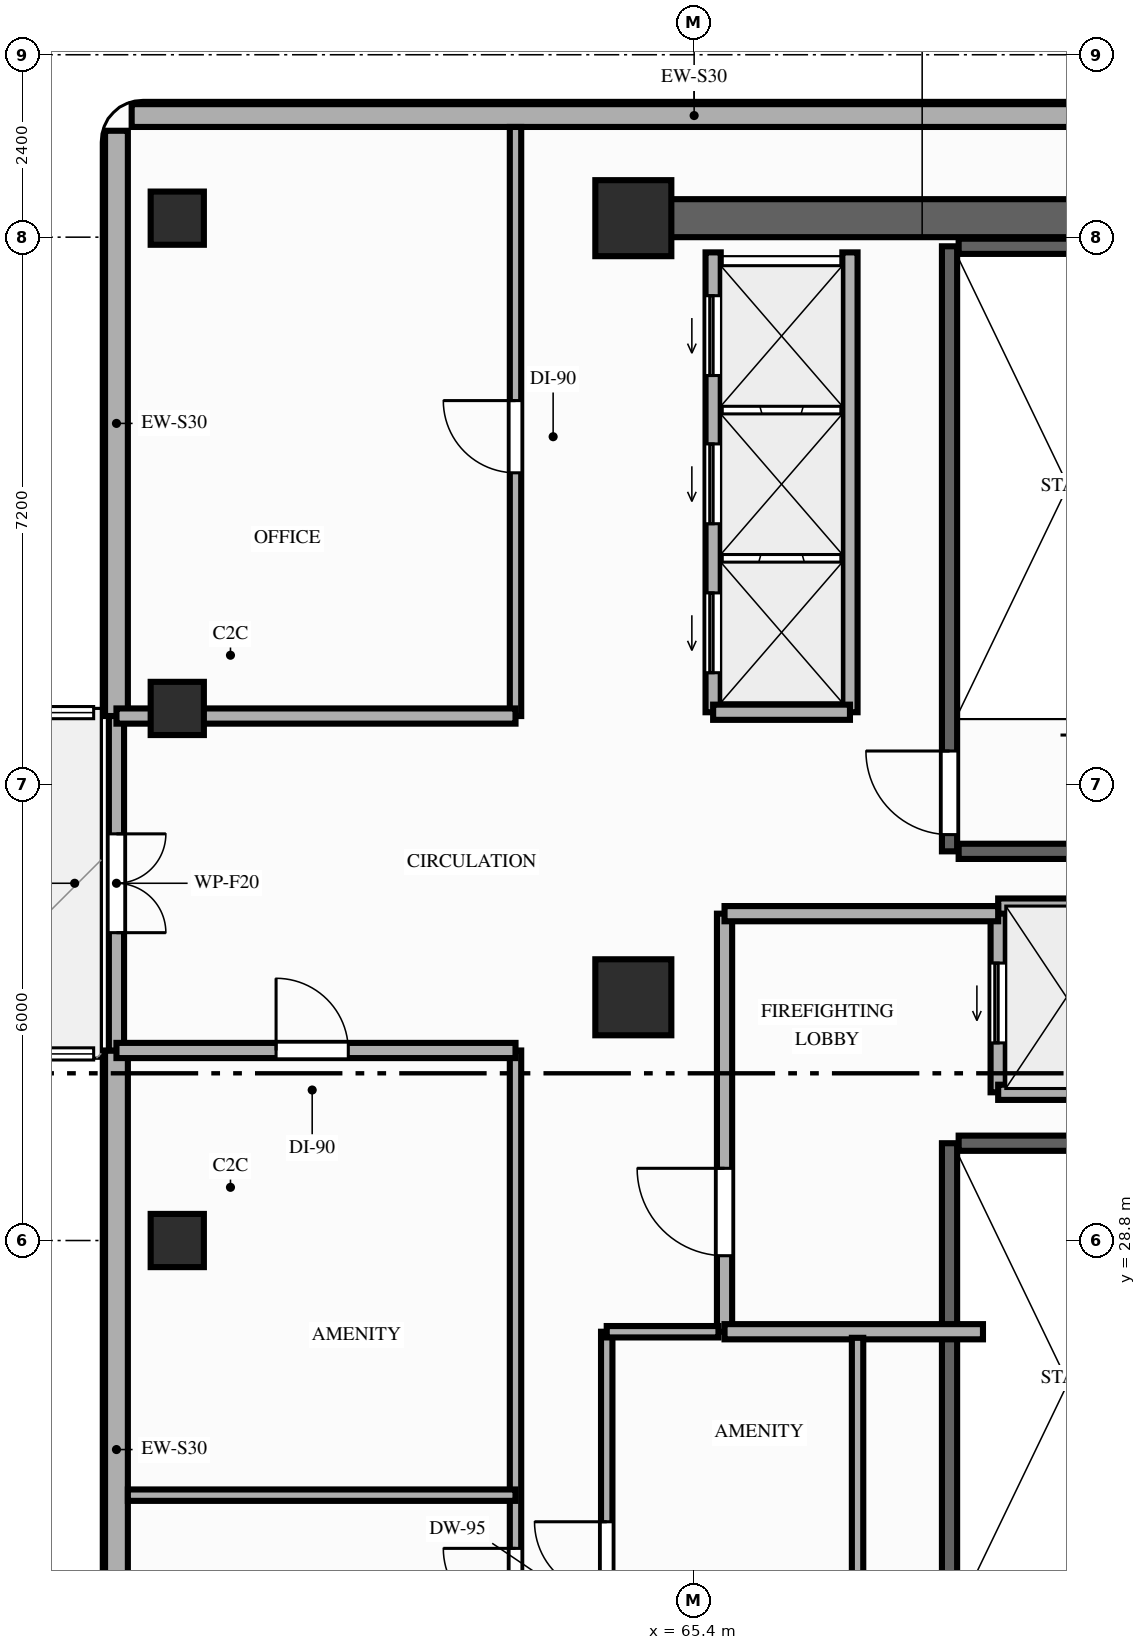
"""IFC4 building model, lengths in metres.
Left out: names, types, materials, properties, quantities, classifications, styles, units other than length and angle.
Written with IfcOpenShell. Run it as: python <this file> out.ifc"""

import sys

from ifc_helpers import new_model, si_unit, direction, frame, frame_2d, origin, origin_2d, place, context, subcontext, project, spatial, rectangle, extrude, element, fill, save


model = new_model("IFC4")
c1 = context("Model", 3, precision=1e-05, world=origin(), true_north=direction((0.0, 1.0)))
c2 = subcontext(c1, "Body", "Model", "MODEL_VIEW")
j1 = project(units=[si_unit("LENGTHUNIT", "METRE"), si_unit("PLANEANGLEUNIT", "RADIAN")], contexts=[c1])
p1 = place(None, origin())
s1 = spatial("IfcSite", under=j1, at=p1, CompositionType="ELEMENT")
p2 = place(p1, origin())
s2 = spatial("IfcBuilding", under=s1, at=p2, CompositionType="ELEMENT")
p3 = place(p2, frame((0.0, 0.0, 102.6)))
s3 = spatial("IfcBuildingStorey", under=s2, at=p3, CompositionType="ELEMENT", Elevation=102.6)
for number, where, z_axis, x_axis in (
    (1, (64.6, 32.0, 0.0), (0.0, 0.0, 1.0), (1.0, 0.0, 0.0)),
    (2, (64.6, 42.25, 0.0), (0.0, 0.0, 1.0), (1.0, 0.0, 0.0)),
):
    element("IfcColumn", number, at=place(p3, frame(where, z_axis=z_axis, x_axis=x_axis)), inside=s3, PredefinedType="COLUMN", context=c2, shape_type="SweptSolid", body=[
        extrude(rectangle(XDim=1.0, YDim=1.0, at=origin_2d()), origin(), (0.0, 0.0, 1.0), 4.8),
    ])
for number, where, z_axis, x_axis in (
    (3, (58.6, 28.8, 0.0), (0.0, 0.0, 1.0), (1.0, 0.0, 0.0)),
    (4, (58.6, 35.8, 0.0), (0.0, 0.0, 1.0), (1.0, 0.0, 0.0)),
    (5, (58.6, 42.25, 0.0), (0.0, 0.0, 1.0), (1.0, 0.0, 0.0)),
):
    element("IfcColumn", number, at=place(p3, frame(where, z_axis=z_axis, x_axis=x_axis)), inside=s3, PredefinedType="COLUMN", context=c2, shape_type="SweptSolid", body=[
        extrude(rectangle(XDim=0.7, YDim=0.7, at=origin_2d()), origin(), (0.0, 0.0, 1.0), 4.8),
    ])
p4 = place(p3, frame((57.8, 31.3, 0.0), z_axis=(0.0, 0.0, 1.0), x_axis=(0.0, -1.0, 0.0)))
e6 = element("IfcWall", 6, at=p4, inside=s3, PredefinedType="STANDARD", context=c2, shape_type="SweptSolid", body=[
    extrude(rectangle(XDim=10.5, YDim=0.3, at=frame_2d((5.25, 0.0))), origin(), (0.0, 0.0, 1.0), 4.58),
])
p5 = place(p3, frame((57.8, 43.4, 0.0), z_axis=(0.0, 0.0, 1.0), x_axis=(0.0, -1.0, 0.0)))
e7 = element("IfcWall", 7, at=p5, inside=s3, PredefinedType="STANDARD", context=c2, shape_type="SweptSolid", body=[
    extrude(rectangle(XDim=7.7, YDim=0.3, at=frame_2d((3.85, 0.0))), origin(), (0.0, 0.0, 1.0), 4.58),
])
p6 = place(p3, frame((72.8, 43.6, 0.0), z_axis=(0.0, 0.0, 1.0), x_axis=(-1.0, 0.0, 0.0)))
e8 = element("IfcWall", 8, at=p6, inside=s3, PredefinedType="STANDARD", context=c2, shape_type="SweptSolid", body=[
    extrude(rectangle(XDim=14.8, YDim=0.3, at=frame_2d((7.4, 0.0))), origin(), (0.0, 0.0, 1.0), 4.58),
])
p7 = place(p3, frame((64.6, 42.25, 0.0), z_axis=(0.0, 0.0, 1.0), x_axis=(1.0, 0.0, 0.0)))
e9 = element("IfcWall", 9, at=p7, inside=s3, PredefinedType="SHEAR", context=c2, shape_type="SweptSolid", body=[
    extrude(rectangle(XDim=7.5, YDim=0.5, at=frame_2d((3.75, 0.0))), origin(), (0.0, 0.0, 1.0), 4.56),
])
p8 = place(p3, frame((68.76, 22.26, 0.0), z_axis=(0.0, 0.0, 1.0), x_axis=(0.0, 1.0, 0.0)))
e10 = element("IfcWall", 10, at=p8, inside=s3, PredefinedType="SHEAR", context=c2, shape_type="SweptSolid", body=[
    extrude(rectangle(XDim=7.82, YDim=0.2, at=frame_2d((3.91, 0.0))), origin(), (0.0, 0.0, 1.0), 4.56),
])
p9 = place(p8, frame((0.22, 0.0, 0.0)))
e11 = element("IfcOpeningElement", 11, at=p9, cuts=e10, PredefinedType="OPENING", context=c2, shape_type="SweptSolid", body=[
    extrude(rectangle(XDim=1.1, YDim=2.15, at=frame_2d((0.55, 1.075))), frame((0.0, 0.11, 0.0), z_axis=(0.0, -1.0, 0.0), x_axis=(1.0, 0.0, 0.0)), (0.0, 0.0, 1.0), 0.22),
])
p10 = place(p3, frame((68.88, 30.08, 0.0), z_axis=(0.0, 0.0, 1.0), x_axis=(1.0, 0.0, 0.0)))
e12 = element("IfcWall", 12, at=p10, inside=s3, PredefinedType="SHEAR", context=c2, shape_type="SweptSolid", body=[
    extrude(rectangle(XDim=2.88, YDim=0.2, at=frame_2d((1.44, 0.0))), origin(), (0.0, 0.0, 1.0), 4.56),
])
p11 = place(p3, frame((68.76, 33.92, 0.0), z_axis=(0.0, 0.0, 1.0), x_axis=(0.0, 1.0, 0.0)))
e13 = element("IfcWall", 13, at=p11, inside=s3, PredefinedType="SHEAR", context=c2, shape_type="SweptSolid", body=[
    extrude(rectangle(XDim=7.96, YDim=0.2, at=frame_2d((3.98, 0.0))), origin(), (0.0, 0.0, 1.0), 4.56),
])
p12 = place(p11, frame((0.22, 0.0, 0.0)))
e14 = element("IfcOpeningElement", 14, at=p12, cuts=e13, PredefinedType="OPENING", context=c2, shape_type="SweptSolid", body=[
    extrude(rectangle(XDim=1.1, YDim=2.15, at=frame_2d((0.55, 1.075))), frame((0.0, 0.11, 0.0), z_axis=(0.0, -1.0, 0.0), x_axis=(1.0, 0.0, 0.0)), (0.0, 0.0, 1.0), 0.22),
])
for number, where, z_axis, x_axis in (
    (15, (68.88, 41.88, 0.0), (0.0, 0.0, 1.0), (1.0, 0.0, 0.0)),
    (16, (68.88, 33.92, 0.0), (0.0, 0.0, 1.0), (1.0, 0.0, 0.0)),
):
    element("IfcWall", number, at=place(p3, frame(where, z_axis=z_axis, x_axis=x_axis)), inside=s3, PredefinedType="SHEAR", context=c2, shape_type="SweptSolid", body=[
        extrude(rectangle(XDim=2.88, YDim=0.2, at=frame_2d((1.44, 0.0))), origin(), (0.0, 0.0, 1.0), 4.56),
    ])
p13 = place(p3, frame((65.65, 35.75, 0.0), z_axis=(0.0, 0.0, 1.0), x_axis=(0.0, 1.0, 0.0)))
e17 = element("IfcWall", 17, at=p13, inside=s3, PredefinedType="MOVABLE", context=c2, shape_type="SweptSolid", body=[
    extrude(rectangle(XDim=6.05, YDim=0.2, at=frame_2d((3.025, 0.0))), origin(), (0.0, 0.0, 1.0), 4.56),
])
p14 = place(p13, frame((0.52, 0.0, 0.0)))
e18 = element("IfcOpeningElement", 18, at=p14, cuts=e17, PredefinedType="OPENING", context=c2, shape_type="SweptSolid", body=[
    extrude(rectangle(XDim=1.05, YDim=2.15, at=frame_2d((0.525, 1.075))), frame((0.0, 0.11, 0.0), z_axis=(0.0, -1.0, 0.0), x_axis=(1.0, 0.0, 0.0)), (0.0, 0.0, 1.0), 0.22),
])
p15 = place(p13, frame((2.48, 0.0, 0.0)))
e19 = element("IfcOpeningElement", 19, at=p15, cuts=e17, PredefinedType="OPENING", context=c2, shape_type="SweptSolid", body=[
    extrude(rectangle(XDim=1.05, YDim=2.15, at=frame_2d((0.525, 1.075))), frame((0.0, 0.11, 0.0), z_axis=(0.0, -1.0, 0.0), x_axis=(1.0, 0.0, 0.0)), (0.0, 0.0, 1.0), 0.22),
])
p16 = place(p13, frame((4.43, 0.0, 0.0)))
e20 = element("IfcOpeningElement", 20, at=p16, cuts=e17, PredefinedType="OPENING", context=c2, shape_type="SweptSolid", body=[
    extrude(rectangle(XDim=1.05, YDim=2.15, at=frame_2d((0.525, 1.075))), frame((0.0, 0.11, 0.0), z_axis=(0.0, -1.0, 0.0), x_axis=(1.0, 0.0, 0.0)), (0.0, 0.0, 1.0), 0.22),
])
p17 = place(p3, frame((67.45, 35.75, 0.0), z_axis=(0.0, 0.0, 1.0), x_axis=(0.0, 1.0, 0.0)))
e21 = element("IfcWall", 21, at=p17, inside=s3, PredefinedType="MOVABLE", context=c2, shape_type="SweptSolid", body=[
    extrude(rectangle(XDim=6.05, YDim=0.2, at=frame_2d((3.025, 0.0))), origin(), (0.0, 0.0, 1.0), 4.56),
])
p18 = place(p3, frame((65.65, 35.75, 0.0), z_axis=(0.0, 0.0, 1.0), x_axis=(1.0, 0.0, 0.0)))
e22 = element("IfcWall", 22, at=p18, inside=s3, PredefinedType="MOVABLE", context=c2, shape_type="SweptSolid", body=[
    extrude(rectangle(XDim=1.8, YDim=0.2, at=frame_2d((0.9, 0.0))), origin(), (0.0, 0.0, 1.0), 4.56),
])
p19 = place(p3, frame((69.4, 30.75, 0.0), z_axis=(0.0, 0.0, 1.0), x_axis=(0.0, 1.0, 0.0)))
e23 = element("IfcWall", 23, at=p19, inside=s3, PredefinedType="MOVABLE", context=c2, shape_type="SweptSolid", body=[
    extrude(rectangle(XDim=2.45, YDim=0.2, at=frame_2d((1.225, 0.0))), origin(), (0.0, 0.0, 1.0), 4.56),
])
p20 = place(p19, frame((0.65, 0.0, 0.0)))
e24 = element("IfcOpeningElement", 24, at=p20, cuts=e23, PredefinedType="OPENING", context=c2, shape_type="SweptSolid", body=[
    extrude(rectangle(XDim=1.05, YDim=2.15, at=frame_2d((0.525, 1.075))), frame((0.0, 0.11, 0.0), z_axis=(0.0, -1.0, 0.0), x_axis=(1.0, 0.0, 0.0)), (0.0, 0.0, 1.0), 0.22),
])
for number, where, z_axis, x_axis in (
    (25, (69.4, 33.2, 0.0), (0.0, 0.0, 1.0), (1.0, 0.0, 0.0)),
    (26, (69.4, 30.75, 0.0), (0.0, 0.0, 1.0), (1.0, 0.0, 0.0)),
):
    element("IfcWall", number, at=place(p3, frame(where, z_axis=z_axis, x_axis=x_axis)), inside=s3, PredefinedType="MOVABLE", context=c2, shape_type="SweptSolid", body=[
        extrude(rectangle(XDim=1.75, YDim=0.2, at=frame_2d((0.875, 0.0))), origin(), (0.0, 0.0, 1.0), 4.56),
    ])
p21 = place(p3, frame((65.8, 27.6, 0.0), z_axis=(0.0, 0.0, 1.0), x_axis=(0.0, 1.0, 0.0)))
e27 = element("IfcWall", 27, at=p21, inside=s3, PredefinedType="PARTITIONING", context=c2, shape_type="SweptSolid", body=[
    extrude(rectangle(XDim=5.5, YDim=0.2, at=frame_2d((2.75, 0.0))), origin(), (0.0, 0.0, 1.0), 4.56),
])
p22 = place(p21, frame((1.0, 0.0, 0.0)))
e28 = element("IfcOpeningElement", 28, at=p22, cuts=e27, PredefinedType="OPENING", context=c2, shape_type="SweptSolid", body=[
    extrude(rectangle(XDim=1.15, YDim=2.15, at=frame_2d((0.575, 1.075))), frame((0.0, 0.11, 0.0), z_axis=(0.0, -1.0, 0.0), x_axis=(1.0, 0.0, 0.0)), (0.0, 0.0, 1.0), 0.22),
])
p23 = place(p3, frame((65.8, 33.1, 0.0), z_axis=(0.0, 0.0, 1.0), x_axis=(1.0, 0.0, 0.0)))
e29 = element("IfcWall", 29, at=p23, inside=s3, PredefinedType="PARTITIONING", context=c2, shape_type="SweptSolid", body=[
    extrude(rectangle(XDim=3.6, YDim=0.2, at=frame_2d((1.8, 0.0))), origin(), (0.0, 0.0, 1.0), 4.56),
])
p24 = place(p3, frame((65.8, 27.6, 0.0), z_axis=(0.0, 0.0, 1.0), x_axis=(1.0, 0.0, 0.0)))
e30 = element("IfcWall", 30, at=p24, inside=s3, PredefinedType="PARTITIONING", context=c2, shape_type="SweptSolid", body=[
    extrude(rectangle(XDim=3.4, YDim=0.2, at=frame_2d((1.7, 0.0))), origin(), (0.0, 0.0, 1.0), 4.56),
])
p25 = place(p3, frame((57.8, 31.3, 0.0), z_axis=(0.0, 0.0, 1.0), x_axis=(0.0, 1.0, 0.0)))
e31 = element("IfcWall", 31, at=p25, inside=s3, PredefinedType="PARTITIONING", context=c2, shape_type="SweptSolid", body=[
    extrude(rectangle(XDim=4.4, YDim=0.2, at=frame_2d((2.2, 0.0))), origin(), (0.0, 0.0, 1.0), 4.56),
])
p26 = place(p25, frame((1.55, 0.0, 0.0)))
e32 = element("IfcOpeningElement", 32, at=p26, cuts=e31, PredefinedType="OPENING", context=c2, shape_type="SweptSolid", body=[
    extrude(rectangle(XDim=1.3, YDim=2.3, at=frame_2d((0.65, 1.15))), frame((0.0, 0.11, 0.0), z_axis=(0.0, -1.0, 0.0), x_axis=(1.0, 0.0, 0.0)), (0.0, 0.0, 1.0), 0.22),
])
p27 = place(p3, frame((64.25, 21.05, 0.0), z_axis=(0.0, 0.0, 1.0), x_axis=(0.0, 1.0, 0.0)))
e33 = element("IfcWall", 33, at=p27, inside=s3, PredefinedType="PARTITIONING", context=c2, shape_type="SweptSolid", body=[
    extrude(rectangle(XDim=6.55, YDim=0.15, at=frame_2d((3.275, 0.0))), origin(), (0.0, 0.0, 1.0), 4.17),
])
p28 = place(p27, frame((3.1, 0.0, 0.0)))
e34 = element("IfcOpeningElement", 34, at=p28, cuts=e33, PredefinedType="OPENING", context=c2, shape_type="SweptSolid", body=[
    extrude(rectangle(XDim=0.95, YDim=2.15, at=frame_2d((0.475, 1.075))), frame((0.0, 0.085, 0.0), z_axis=(0.0, -1.0, 0.0), x_axis=(1.0, 0.0, 0.0)), (0.0, 0.0, 1.0), 0.17),
])
p29 = place(p3, frame((67.55, 21.05, 0.0), z_axis=(0.0, 0.0, 1.0), x_axis=(0.0, 1.0, 0.0)))
e35 = element("IfcWall", 35, at=p29, inside=s3, PredefinedType="PARTITIONING", context=c2, shape_type="SweptSolid", body=[
    extrude(rectangle(XDim=6.47, YDim=0.15, at=frame_2d((3.235, 0.0))), origin(), (0.0, 0.0, 1.0), 4.17),
])
p30 = place(p3, frame((64.25, 27.6, 0.0), z_axis=(0.0, 0.0, 1.0), x_axis=(1.0, 0.0, 0.0)))
e36 = element("IfcWall", 36, at=p30, inside=s3, PredefinedType="PARTITIONING", context=c2, shape_type="SweptSolid", body=[
    extrude(rectangle(XDim=1.47, YDim=0.15, at=frame_2d((0.735, 0.0))), origin(), (0.0, 0.0, 1.0), 4.17),
])
p31 = place(p3, frame((63.05, 20.75, 0.0), z_axis=(0.0, 0.0, 1.0), x_axis=(0.0, 1.0, 0.0)))
e37 = element("IfcWall", 37, at=p31, inside=s3, PredefinedType="PARTITIONING", context=c2, shape_type="SweptSolid", body=[
    extrude(rectangle(XDim=10.55, YDim=0.15, at=frame_2d((5.275, 0.0))), origin(), (0.0, 0.0, 1.0), 4.17),
])
p32 = place(p31, frame((0.73, 0.0, 0.0)))
e38 = element("IfcOpeningElement", 38, at=p32, cuts=e37, PredefinedType="OPENING", context=c2, shape_type="SweptSolid", body=[
    extrude(rectangle(XDim=0.85, YDim=2.1, at=frame_2d((0.425, 1.05))), frame((0.0, 0.085, 0.0), z_axis=(0.0, -1.0, 0.0), x_axis=(1.0, 0.0, 0.0)), (0.0, 0.0, 1.0), 0.17),
])
p33 = place(p31, frame((3.05, 0.0, 0.0)))
e39 = element("IfcOpeningElement", 39, at=p33, cuts=e37, PredefinedType="OPENING", context=c2, shape_type="SweptSolid", body=[
    extrude(rectangle(XDim=0.95, YDim=2.1, at=frame_2d((0.475, 1.05))), frame((0.0, 0.085, 0.0), z_axis=(0.0, -1.0, 0.0), x_axis=(1.0, 0.0, 0.0)), (0.0, 0.0, 1.0), 0.17),
])
p34 = place(p3, frame((63.05, 35.7, 0.0), z_axis=(0.0, 0.0, 1.0), x_axis=(0.0, 1.0, 0.0)))
e40 = element("IfcWall", 40, at=p34, inside=s3, PredefinedType="PARTITIONING", context=c2, shape_type="SweptSolid", body=[
    extrude(rectangle(XDim=7.75, YDim=0.15, at=frame_2d((3.875, 0.0))), origin(), (0.0, 0.0, 1.0), 4.17),
])
p35 = place(p34, frame((3.2, 0.0, 0.0)))
e41 = element("IfcOpeningElement", 41, at=p35, cuts=e40, PredefinedType="OPENING", context=c2, shape_type="SweptSolid", body=[
    extrude(rectangle(XDim=0.95, YDim=2.15, at=frame_2d((0.475, 1.075))), frame((0.0, 0.085, 0.0), z_axis=(0.0, -1.0, 0.0), x_axis=(1.0, 0.0, 0.0)), (0.0, 0.0, 1.0), 0.17),
])
p36 = place(p3, frame((57.8, 31.3, 0.0), z_axis=(0.0, 0.0, 1.0), x_axis=(1.0, 0.0, 0.0)))
e42 = element("IfcWall", 42, at=p36, inside=s3, PredefinedType="PARTITIONING", context=c2, shape_type="SweptSolid", body=[
    extrude(rectangle(XDim=5.25, YDim=0.2, at=frame_2d((2.625, 0.0))), origin(), (0.0, 0.0, 1.0), 4.17),
])
p37 = place(p36, frame((2.1, 0.0, 0.0)))
e43 = element("IfcOpeningElement", 43, at=p37, cuts=e42, PredefinedType="OPENING", context=c2, shape_type="SweptSolid", body=[
    extrude(rectangle(XDim=0.95, YDim=2.15, at=frame_2d((0.475, 1.075))), frame((0.0, 0.11, 0.0), z_axis=(0.0, -1.0, 0.0), x_axis=(1.0, 0.0, 0.0)), (0.0, 0.0, 1.0), 0.22),
])
p38 = place(p3, frame((57.8, 35.7, 0.0), z_axis=(0.0, 0.0, 1.0), x_axis=(1.0, 0.0, 0.0)))
e44 = element("IfcWall", 44, at=p38, inside=s3, PredefinedType="PARTITIONING", context=c2, shape_type="SweptSolid", body=[
    extrude(rectangle(XDim=5.25, YDim=0.2, at=frame_2d((2.625, 0.0))), origin(), (0.0, 0.0, 1.0), 4.17),
])
p39 = place(p3, frame((57.95, 25.45, 0.0), z_axis=(0.0, 0.0, 1.0), x_axis=(1.0, 0.0, 0.0)))
e45 = element("IfcWall", 45, at=p39, inside=s3, PredefinedType="PARTITIONING", context=c2, shape_type="SweptSolid", body=[
    extrude(rectangle(XDim=5.1, YDim=0.15, at=frame_2d((2.55, 0.0))), origin(), (0.0, 0.0, 1.0), 4.17),
])
p40 = place(p12, origin())
e46 = element("IfcDoor", 46, at=p40, inside=s3, OperationType="SINGLE_SWING_RIGHT", PredefinedType="DOOR", context=c2, shape_type="SweptSolid", body=[
    extrude(rectangle(XDim=1.1, YDim=2.15, at=frame_2d((0.55, 1.075))), frame((0.0, 0.025, 0.0), z_axis=(0.0, -1.0, 0.0), x_axis=(1.0, 0.0, 0.0)), (0.0, 0.0, 1.0), 0.05),
])
fill(e14, e46)
p41 = place(p14, origin())
e47 = element("IfcDoor", 47, at=p41, inside=s3, OperationType="SLIDING_TO_LEFT", PredefinedType="DOOR", context=c2, shape_type="SweptSolid", body=[
    extrude(rectangle(XDim=1.05, YDim=2.15, at=frame_2d((0.525, 1.075))), frame((0.0, 0.025, 0.0), z_axis=(0.0, -1.0, 0.0), x_axis=(1.0, 0.0, 0.0)), (0.0, 0.0, 1.0), 0.05),
])
fill(e18, e47)
p42 = place(p15, origin())
e48 = element("IfcDoor", 48, at=p42, inside=s3, OperationType="SLIDING_TO_LEFT", PredefinedType="DOOR", context=c2, shape_type="SweptSolid", body=[
    extrude(rectangle(XDim=1.05, YDim=2.15, at=frame_2d((0.525, 1.075))), frame((0.0, 0.025, 0.0), z_axis=(0.0, -1.0, 0.0), x_axis=(1.0, 0.0, 0.0)), (0.0, 0.0, 1.0), 0.05),
])
fill(e19, e48)
p43 = place(p16, origin())
e49 = element("IfcDoor", 49, at=p43, inside=s3, OperationType="SLIDING_TO_LEFT", PredefinedType="DOOR", context=c2, shape_type="SweptSolid", body=[
    extrude(rectangle(XDim=1.05, YDim=2.15, at=frame_2d((0.525, 1.075))), frame((0.0, 0.025, 0.0), z_axis=(0.0, -1.0, 0.0), x_axis=(1.0, 0.0, 0.0)), (0.0, 0.0, 1.0), 0.05),
])
fill(e20, e49)
p44 = place(p20, origin())
e50 = element("IfcDoor", 50, at=p44, inside=s3, OperationType="SLIDING_TO_LEFT", PredefinedType="DOOR", context=c2, shape_type="SweptSolid", body=[
    extrude(rectangle(XDim=1.05, YDim=2.15, at=frame_2d((0.525, 1.075))), frame((0.0, 0.025, 0.0), z_axis=(0.0, -1.0, 0.0), x_axis=(1.0, 0.0, 0.0)), (0.0, 0.0, 1.0), 0.05),
])
fill(e24, e50)
p45 = place(p22, origin())
e51 = element("IfcDoor", 51, at=p45, inside=s3, OperationType="SINGLE_SWING_RIGHT", PredefinedType="DOOR", context=c2, shape_type="SweptSolid", body=[
    extrude(rectangle(XDim=1.15, YDim=2.15, at=frame_2d((0.575, 1.075))), frame((0.0, 0.025, 0.0), z_axis=(0.0, -1.0, 0.0), x_axis=(1.0, 0.0, 0.0)), (0.0, 0.0, 1.0), 0.05),
])
fill(e28, e51)
p46 = place(p26, origin())
e52 = element("IfcDoor", 52, at=p46, inside=s3, OperationType="DOUBLE_SWING_RIGHT", PredefinedType="DOOR", context=c2, shape_type="SweptSolid", body=[
    extrude(rectangle(XDim=1.3, YDim=2.3, at=frame_2d((0.65, 1.15))), frame((0.0, 0.025, 0.0), z_axis=(0.0, -1.0, 0.0), x_axis=(1.0, 0.0, 0.0)), (0.0, 0.0, 1.0), 0.05),
])
fill(e32, e52)
p47 = place(p28, origin())
e53 = element("IfcDoor", 53, at=p47, inside=s3, OperationType="SINGLE_SWING_RIGHT", PredefinedType="DOOR", context=c2, shape_type="SweptSolid", body=[
    extrude(rectangle(XDim=0.95, YDim=2.15, at=frame_2d((0.475, 1.075))), frame((0.0, 0.025, 0.0), z_axis=(0.0, -1.0, 0.0), x_axis=(1.0, 0.0, 0.0)), (0.0, 0.0, 1.0), 0.05),
])
fill(e34, e53)
p48 = place(p33, origin())
e54 = element("IfcDoor", 54, at=p48, inside=s3, OperationType="SINGLE_SWING_RIGHT", PredefinedType="DOOR", context=c2, shape_type="SweptSolid", body=[
    extrude(rectangle(XDim=0.95, YDim=2.1, at=frame_2d((0.475, 1.05))), frame((0.0, 0.025, 0.0), z_axis=(0.0, -1.0, 0.0), x_axis=(1.0, 0.0, 0.0)), (0.0, 0.0, 1.0), 0.05),
])
fill(e39, e54)
p49 = place(p37, origin())
e55 = element("IfcDoor", 55, at=p49, inside=s3, OperationType="SINGLE_SWING_LEFT", PredefinedType="DOOR", context=c2, shape_type="SweptSolid", body=[
    extrude(rectangle(XDim=0.95, YDim=2.15, at=frame_2d((0.475, 1.075))), frame((0.0, 0.025, 0.0), z_axis=(0.0, -1.0, 0.0), x_axis=(1.0, 0.0, 0.0)), (0.0, 0.0, 1.0), 0.05),
])
fill(e43, e55)
p50 = place(p35, origin())
e56 = element("IfcDoor", 56, at=p50, inside=s3, OperationType="SINGLE_SWING_RIGHT", PredefinedType="DOOR", context=c2, shape_type="SweptSolid", body=[
    extrude(rectangle(XDim=0.95, YDim=2.15, at=frame_2d((0.475, 1.075))), frame((0.0, 0.025, 0.0), z_axis=(0.0, -1.0, 0.0), x_axis=(1.0, 0.0, 0.0)), (0.0, 0.0, 1.0), 0.05),
])
fill(e41, e56)
save(model, sys.argv[1])
